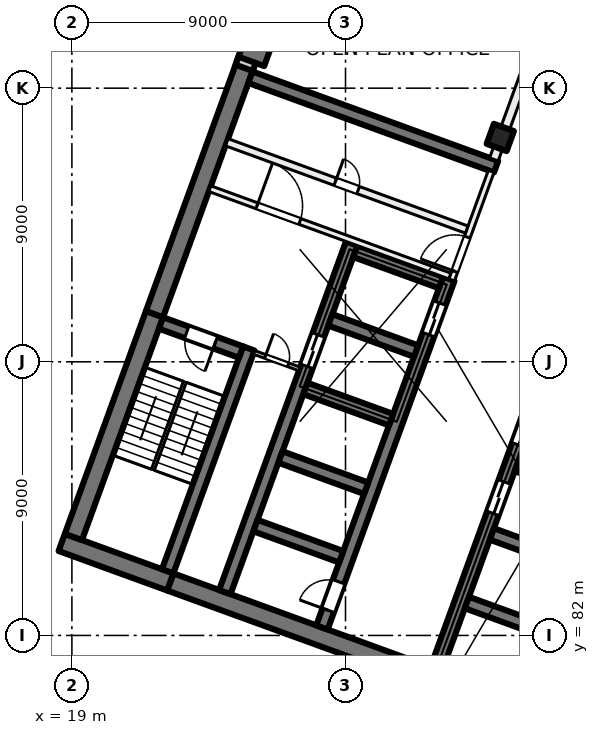
"""IFC4 building model, lengths in metres.
Left out: names, types, materials, properties, quantities, classifications, styles, units other than length and angle.
Written with IfcOpenShell. Run it as: python <this file> out.ifc"""

import sys

from ifc_helpers import new_model, si_unit, direction, frame, frame_2d, origin, origin_2d, place, context, subcontext, project, spatial, rectangle, extrude, element, fill, save


model = new_model("IFC4")
c1 = context("Model", 3, precision=1e-05, world=origin(), true_north=direction((0.0, 1.0)))
c2 = subcontext(c1, "Body", "Model", "MODEL_VIEW")
j1 = project(units=[si_unit("LENGTHUNIT", "METRE"), si_unit("PLANEANGLEUNIT", "RADIAN")], contexts=[c1])
p1 = place(None, origin())
s1 = spatial("IfcSite", under=j1, at=p1, CompositionType="ELEMENT")
p2 = place(p1, origin())
s2 = spatial("IfcBuilding", under=s1, at=p2, CompositionType="ELEMENT")
p3 = place(p2, frame((0.0, 0.0, 47.5)))
s3 = spatial("IfcBuildingStorey", under=s2, at=p3, CompositionType="ELEMENT", Elevation=47.5)
p4 = place(p3, frame((33.091, 98.379, 0.0), z_axis=(0.0, 0.0, 1.0), x_axis=(-0.342020143326, -0.939692620786, 0.0)))
e1 = element("IfcColumn", 1, at=p4, inside=s3, PredefinedType="COLUMN", context=c2, shape_type="SweptSolid", body=[
    extrude(rectangle(XDim=0.7, YDim=0.7, at=origin_2d()), origin(), (0.0, 0.0, 1.0), 4.0),
])
p5 = place(p3, frame((25.056, 101.303, 0.0), z_axis=(0.0, 0.0, 1.0), x_axis=(-0.342020143326, -0.939692620786, 0.0)))
e2 = element("IfcColumn", 2, at=p5, inside=s3, PredefinedType="COLUMN", context=c2, shape_type="SweptSolid", body=[
    extrude(rectangle(XDim=0.9, YDim=0.9, at=origin_2d()), origin(), (0.0, 0.0, 1.0), 4.0),
])
p6 = place(p3, frame((35.767, 78.835, 0.0), z_axis=(0.0, 0.0, 1.0), x_axis=(-0.939692894512, 0.342019391267, 0.0)))
e3 = element("IfcWall", 3, at=p6, inside=s3, PredefinedType="SHEAR", context=c2, shape_type="SweptSolid", body=[
    extrude(rectangle(XDim=14.4, YDim=0.6, at=frame_2d((7.2, 0.0))), origin(), (0.0, 0.0, 1.0), 4.0),
])
p7 = place(p3, frame((22.236, 83.76, 0.0), z_axis=(0.0, 0.0, 1.0), x_axis=(-0.939680822529, 0.342052557032, 0.0)))
e4 = element("IfcWall", 4, at=p7, inside=s3, PredefinedType="SHEAR", context=c2, shape_type="SweptSolid", body=[
    extrude(rectangle(XDim=3.8, YDim=0.6, at=frame_2d((1.9, 0.0))), origin(), (0.0, 0.0, 1.0), 4.0),
])
p8 = place(p3, frame((19.05, 85.239, 0.0), z_axis=(0.0, 0.0, 1.0), x_axis=(0.342016982193, 0.939693771338, 0.0)))
e5 = element("IfcWall", 5, at=p8, inside=s3, PredefinedType="SHEAR", context=c2, shape_type="SweptSolid", body=[
    extrude(rectangle(XDim=7.8, YDim=0.6, at=frame_2d((3.9, 0.0))), origin(), (0.0, 0.0, 1.0), 4.0),
])
p9 = place(p3, frame((21.717, 92.568, 0.0), z_axis=(0.0, 0.0, 1.0), x_axis=(0.342016162452, 0.939694069696, 0.0)))
e6 = element("IfcWall", 6, at=p9, inside=s3, PredefinedType="SHEAR", context=c2, shape_type="SweptSolid", body=[
    extrude(rectangle(XDim=8.9, YDim=0.6, at=frame_2d((4.45, 0.0))), origin(), (0.0, 0.0, 1.0), 4.0),
])
p10 = place(p3, frame((22.15, 84.11, 0.0), z_axis=(0.0, 0.0, 1.0), x_axis=(0.342016982193, 0.939693771338, 0.0)))
e7 = element("IfcWall", 7, at=p10, inside=s3, PredefinedType="SHEAR", context=c2, shape_type="SweptSolid", body=[
    extrude(rectangle(XDim=7.8, YDim=0.4, at=frame_2d((3.9, 0.0))), origin(), (0.0, 0.0, 1.0), 4.0),
])
p11 = place(p3, frame((24.562, 91.32, 0.0), z_axis=(0.0, 0.0, 1.0), x_axis=(-0.939717030584, 0.341953070509, 0.0)))
e8 = element("IfcWall", 8, at=p11, inside=s3, PredefinedType="SHEAR", context=c2, shape_type="SweptSolid", body=[
    extrude(rectangle(XDim=2.8, YDim=0.4, at=frame_2d((1.4, 0.0))), origin(), (0.0, 0.0, 1.0), 4.0),
])
p12 = place(p11, frame((0.9, 0.0, 0.0)))
e9 = element("IfcOpeningElement", 9, at=p12, cuts=e8, PredefinedType="OPENING", context=c2, shape_type="SweptSolid", body=[
    extrude(rectangle(XDim=1.0, YDim=2.1, at=frame_2d((0.5, 1.05))), frame((0.0, 0.21, 0.0), z_axis=(0.0, -1.0, 0.0), x_axis=(1.0, 0.0, 0.0)), (0.0, 0.0, 1.0), 0.42),
])
p13 = place(p3, frame((30.984, 80.895, 0.0), z_axis=(0.0, 0.0, 1.0), x_axis=(0.342021021735, 0.939692301071, 0.0)))
e10 = element("IfcWall", 10, at=p13, inside=s3, PredefinedType="SHEAR", context=c2, shape_type="SweptSolid", body=[
    extrude(rectangle(XDim=12.2, YDim=0.4, at=frame_2d((6.1, 0.0))), origin(), (0.0, 0.0, 1.0), 4.0),
])
p14 = place(p13, frame((5.45, 0.0, 0.0)))
e11 = element("IfcOpeningElement", 11, at=p14, cuts=e10, PredefinedType="OPENING", context=c2, shape_type="SweptSolid", body=[
    extrude(rectangle(XDim=1.1, YDim=2.1, at=frame_2d((0.55, 1.05))), frame((0.0, 0.21, 0.0), z_axis=(0.0, -1.0, 0.0), x_axis=(1.0, 0.0, 0.0)), (0.0, 0.0, 1.0), 0.42),
])
p15 = place(p13, frame((7.85, 0.0, 0.0)))
e12 = element("IfcOpeningElement", 12, at=p15, cuts=e10, PredefinedType="OPENING", context=c2, shape_type="SweptSolid", body=[
    extrude(rectangle(XDim=1.1, YDim=2.1, at=frame_2d((0.55, 1.05))), frame((0.0, 0.21, 0.0), z_axis=(0.0, -1.0, 0.0), x_axis=(1.0, 0.0, 0.0)), (0.0, 0.0, 1.0), 0.42),
])
p16 = place(p13, frame((10.25, 0.0, 0.0)))
e13 = element("IfcOpeningElement", 13, at=p16, cuts=e10, PredefinedType="OPENING", context=c2, shape_type="SweptSolid", body=[
    extrude(rectangle(XDim=1.1, YDim=2.1, at=frame_2d((0.55, 1.05))), frame((0.0, 0.21, 0.0), z_axis=(0.0, -1.0, 0.0), x_axis=(1.0, 0.0, 0.0)), (0.0, 0.0, 1.0), 0.42),
])
for number, where, z_axis, x_axis in (
    (14, (34.812, 82.056, 0.0), (0.0, 0.0, 1.0), (-0.94, 0.342, 0.0)),
    (15, (35.632, 84.311, 0.0), (0.0, 0.0, 1.0), (-0.94, 0.342, 0.0)),
    (16, (36.453, 86.566, 0.0), (0.0, 0.0, 1.0), (-0.94, 0.342, 0.0)),
):
    element("IfcWall", number, at=place(p3, frame(where, z_axis=z_axis, x_axis=x_axis)), inside=s3, PredefinedType="SHEAR", context=c2, shape_type="SweptSolid", body=[
        extrude(rectangle(XDim=3.0, YDim=0.4, at=frame_2d((1.5, 0.0))), origin(), (0.0, 0.0, 1.0), 4.0),
    ])
p17 = place(p3, frame((27.225, 82.263, 0.0), z_axis=(0.0, 0.0, 1.0), x_axis=(0.342014590177, 0.939694641948, 0.0)))
e17 = element("IfcWall", 17, at=p17, inside=s3, PredefinedType="SHEAR", context=c2, shape_type="SweptSolid", body=[
    extrude(rectangle(XDim=12.2, YDim=0.4, at=frame_2d((6.1, 0.0))), origin(), (0.0, 0.0, 1.0), 4.0),
])
p18 = place(p17, frame((10.25, 0.0, 0.0)))
e18 = element("IfcOpeningElement", 18, at=p18, cuts=e17, PredefinedType="OPENING", context=c2, shape_type="SweptSolid", body=[
    extrude(rectangle(XDim=1.1, YDim=2.1, at=frame_2d((0.55, 1.05))), frame((0.0, 0.21, 0.0), z_axis=(0.0, -1.0, 0.0), x_axis=(1.0, 0.0, 0.0)), (0.0, 0.0, 1.0), 0.42),
])
p19 = place(p17, frame((0.6, 0.0, 0.0)))
e19 = element("IfcOpeningElement", 19, at=p19, cuts=e17, PredefinedType="OPENING", context=c2, shape_type="SweptSolid", body=[
    extrude(rectangle(XDim=1.0, YDim=2.1, at=frame_2d((0.5, 1.05))), frame((0.0, 0.21, 0.0), z_axis=(0.0, -1.0, 0.0), x_axis=(1.0, 0.0, 0.0)), (0.0, 0.0, 1.0), 0.42),
])
p20 = place(p3, frame((24.03, 83.426, 0.0), z_axis=(0.0, 0.0, 1.0), x_axis=(0.342014590177, 0.939694641948, 0.0)))
e20 = element("IfcWall", 20, at=p20, inside=s3, PredefinedType="SHEAR", context=c2, shape_type="SweptSolid", body=[
    extrude(rectangle(XDim=12.2, YDim=0.4, at=frame_2d((6.1, 0.0))), origin(), (0.0, 0.0, 1.0), 4.0),
])
p21 = place(p20, frame((7.9, 0.0, 0.0)))
e21 = element("IfcOpeningElement", 21, at=p21, cuts=e20, PredefinedType="OPENING", context=c2, shape_type="SweptSolid", body=[
    extrude(rectangle(XDim=1.1, YDim=2.1, at=frame_2d((0.55, 1.05))), frame((0.0, 0.21, 0.0), z_axis=(0.0, -1.0, 0.0), x_axis=(1.0, 0.0, 0.0)), (0.0, 0.0, 1.0), 0.42),
])
p22 = place(p3, frame((27.858, 84.587, 0.0), z_axis=(0.0, 0.0, 1.0), x_axis=(-0.939686455819, 0.342037080957, 0.0)))
e22 = element("IfcWall", 22, at=p22, inside=s3, PredefinedType="SHEAR", context=c2, shape_type="SweptSolid", body=[
    extrude(rectangle(XDim=3.0, YDim=0.4, at=frame_2d((1.5, 0.0))), origin(), (0.0, 0.0, 1.0), 4.0),
])
p23 = place(p3, frame((28.678, 86.842, 0.0), z_axis=(0.0, 0.0, 1.0), x_axis=(-0.939676934218, 0.342063238742, 0.0)))
e23 = element("IfcWall", 23, at=p23, inside=s3, PredefinedType="SHEAR", context=c2, shape_type="SweptSolid", body=[
    extrude(rectangle(XDim=3.0, YDim=0.4, at=frame_2d((1.5, 0.0))), origin(), (0.0, 0.0, 1.0), 4.0),
])
for number, where, z_axis, x_axis in (
    (24, (29.5, 89.097, 0.0), (0.0, 0.0, 1.0), (-0.94, 0.342, 0.0)),
    (25, (30.32, 91.353, 0.0), (0.0, 0.0, 1.0), (-0.94, 0.342, 0.0)),
    (26, (31.141, 93.608, 0.0), (0.0, 0.0, 1.0), (-0.94, 0.342, 0.0)),
):
    element("IfcWall", number, at=place(p3, frame(where, z_axis=z_axis, x_axis=x_axis)), inside=s3, PredefinedType="SHEAR", context=c2, shape_type="SweptSolid", body=[
        extrude(rectangle(XDim=3.0, YDim=0.4, at=frame_2d((1.5, 0.0))), origin(), (0.0, 0.0, 1.0), 4.0),
    ])
p24 = place(p3, frame((32.953, 97.418, 0.0), z_axis=(0.0, 0.0, 1.0), x_axis=(-0.93969060187, 0.342025690201, 0.0)))
e27 = element("IfcWall", 27, at=p24, inside=s3, PredefinedType="SHEAR", context=c2, shape_type="SweptSolid", body=[
    extrude(rectangle(XDim=8.6, YDim=0.4, at=frame_2d((4.3, 0.0))), origin(), (0.0, 0.0, 1.0), 4.0),
])
p25 = place(p3, frame((24.666, 100.669, 0.0), z_axis=(0.0, 0.0, 1.0), x_axis=(0.34201964167, 0.939692803373, 0.0)))
e28 = element("IfcWall", 28, at=p25, inside=s3, PredefinedType="SOLIDWALL", context=c2, shape_type="SweptSolid", body=[
    extrude(rectangle(XDim=32.884, YDim=0.6, at=frame_2d((16.442, 0.0))), origin(), (0.0, 0.0, 1.0), 3.625),
])
p26 = place(p25, frame((1.48, 0.0, 0.9)))
e29 = element("IfcOpeningElement", 29, at=p26, cuts=e28, PredefinedType="OPENING", context=c2, shape_type="SweptSolid", body=[
    extrude(rectangle(XDim=3.0, YDim=2.4, at=frame_2d((1.5, 1.2))), frame((0.0, 0.31, 0.0), z_axis=(0.0, -1.0, 0.0), x_axis=(1.0, 0.0, 0.0)), (0.0, 0.0, 1.0), 0.62),
])
p27 = place(p25, frame((5.98, 0.0, 0.9)))
e30 = element("IfcOpeningElement", 30, at=p27, cuts=e28, PredefinedType="OPENING", context=c2, shape_type="SweptSolid", body=[
    extrude(rectangle(XDim=3.0, YDim=2.4, at=frame_2d((1.5, 1.2))), frame((0.0, 0.31, 0.0), z_axis=(0.0, -1.0, 0.0), x_axis=(1.0, 0.0, 0.0)), (0.0, 0.0, 1.0), 0.62),
])
p28 = place(p25, frame((10.48, 0.0, 0.9)))
e31 = element("IfcOpeningElement", 31, at=p28, cuts=e28, PredefinedType="OPENING", context=c2, shape_type="SweptSolid", body=[
    extrude(rectangle(XDim=3.0, YDim=2.4, at=frame_2d((1.5, 1.2))), frame((0.0, 0.31, 0.0), z_axis=(0.0, -1.0, 0.0), x_axis=(1.0, 0.0, 0.0)), (0.0, 0.0, 1.0), 0.62),
])
p29 = place(p25, frame((14.98, 0.0, 0.9)))
e32 = element("IfcOpeningElement", 32, at=p29, cuts=e28, PredefinedType="OPENING", context=c2, shape_type="SweptSolid", body=[
    extrude(rectangle(XDim=3.0, YDim=2.4, at=frame_2d((1.5, 1.2))), frame((0.0, 0.31, 0.0), z_axis=(0.0, -1.0, 0.0), x_axis=(1.0, 0.0, 0.0)), (0.0, 0.0, 1.0), 0.62),
])
p30 = place(p25, frame((19.48, 0.0, 0.9)))
e33 = element("IfcOpeningElement", 33, at=p30, cuts=e28, PredefinedType="OPENING", context=c2, shape_type="SweptSolid", body=[
    extrude(rectangle(XDim=3.0, YDim=2.4, at=frame_2d((1.5, 1.2))), frame((0.0, 0.31, 0.0), z_axis=(0.0, -1.0, 0.0), x_axis=(1.0, 0.0, 0.0)), (0.0, 0.0, 1.0), 0.62),
])
p31 = place(p25, frame((23.98, 0.0, 0.9)))
e34 = element("IfcOpeningElement", 34, at=p31, cuts=e28, PredefinedType="OPENING", context=c2, shape_type="SweptSolid", body=[
    extrude(rectangle(XDim=3.0, YDim=2.4, at=frame_2d((1.5, 1.2))), frame((0.0, 0.31, 0.0), z_axis=(0.0, -1.0, 0.0), x_axis=(1.0, 0.0, 0.0)), (0.0, 0.0, 1.0), 0.62),
])
p32 = place(p25, frame((28.48, 0.0, 0.9)))
e35 = element("IfcOpeningElement", 35, at=p32, cuts=e28, PredefinedType="OPENING", context=c2, shape_type="SweptSolid", body=[
    extrude(rectangle(XDim=3.0, YDim=2.4, at=frame_2d((1.5, 1.2))), frame((0.0, 0.31, 0.0), z_axis=(0.0, -1.0, 0.0), x_axis=(1.0, 0.0, 0.0)), (0.0, 0.0, 1.0), 0.62),
])
p33 = place(p3, frame((31.491, 93.693, 0.0), z_axis=(0.0, 0.0, 1.0), x_axis=(0.341995824804, 0.939701471648, 0.0)))
e36 = element("IfcWall", 36, at=p33, inside=s3, PredefinedType="PARTITIONING", context=c2, shape_type="SweptSolid", body=[
    extrude(rectangle(XDim=3.8, YDim=0.2, at=frame_2d((1.9, 0.0))), origin(), (0.0, 0.0, 1.0), 3.625),
])
p34 = place(p33, frame((0.3, 0.0, 0.0)))
e37 = element("IfcOpeningElement", 37, at=p34, cuts=e36, PredefinedType="OPENING", context=c2, shape_type="SweptSolid", body=[
    extrude(rectangle(XDim=1.2, YDim=2.1, at=frame_2d((0.6, 1.05))), frame((0.0, 0.11, 0.0), z_axis=(0.0, -1.0, 0.0), x_axis=(1.0, 0.0, 0.0)), (0.0, 0.0, 1.0), 0.22),
])
p35 = place(p3, frame((23.538, 96.694, 0.0), z_axis=(0.0, 0.0, 1.0), x_axis=(0.939691552312, -0.342023078919, 0.0)))
e38 = element("IfcWall", 38, at=p35, inside=s3, PredefinedType="PARTITIONING", context=c2, shape_type="SweptSolid", body=[
    extrude(rectangle(XDim=8.4, YDim=0.2, at=frame_2d((4.2, 0.0))), origin(), (0.0, 0.0, 1.0), 3.625),
])
p36 = place(p35, frame((1.65, 0.0, 0.0)))
e39 = element("IfcOpeningElement", 39, at=p36, cuts=e38, PredefinedType="OPENING", context=c2, shape_type="SweptSolid", body=[
    extrude(rectangle(XDim=1.5, YDim=2.1, at=frame_2d((0.75, 1.05))), frame((0.0, 0.11, 0.0), z_axis=(0.0, -1.0, 0.0), x_axis=(1.0, 0.0, 0.0)), (0.0, 0.0, 1.0), 0.22),
])
p37 = place(p3, frame((24.094, 98.221, 0.0), z_axis=(0.0, 0.0, 1.0), x_axis=(0.939691552312, -0.342023078919, 0.0)))
e40 = element("IfcWall", 40, at=p37, inside=s3, PredefinedType="PARTITIONING", context=c2, shape_type="SweptSolid", body=[
    extrude(rectangle(XDim=8.4, YDim=0.25, at=frame_2d((4.2, 0.0))), origin(), (0.0, 0.0, 1.0), 3.625),
])
p38 = place(p37, frame((3.8, 0.0, 0.0)))
e41 = element("IfcOpeningElement", 41, at=p38, cuts=e40, PredefinedType="OPENING", context=c2, shape_type="SweptSolid", body=[
    extrude(rectangle(XDim=0.8, YDim=2.1, at=frame_2d((0.4, 1.05))), frame((0.0, 0.135, 0.0), z_axis=(0.0, -1.0, 0.0), x_axis=(1.0, 0.0, 0.0)), (0.0, 0.0, 1.0), 0.27),
])
p39 = place(p3, frame((24.985, 91.312, 0.0), z_axis=(0.0, 0.0, 1.0), x_axis=(0.939708740826, -0.341975850632, 0.0)))
e42 = element("IfcWall", 42, at=p39, inside=s3, PredefinedType="PARTITIONING", context=c2, shape_type="SweptSolid", body=[
    extrude(rectangle(XDim=1.6, YDim=0.125, at=frame_2d((0.8, 0.0))), origin(), (0.0, 0.0, 1.0), 3.625),
])
p40 = place(p39, frame((0.4, 0.0, 0.0)))
e43 = element("IfcOpeningElement", 43, at=p40, cuts=e42, PredefinedType="OPENING", context=c2, shape_type="SweptSolid", body=[
    extrude(rectangle(XDim=0.8, YDim=2.1, at=frame_2d((0.4, 1.05))), frame((0.0, 0.073, 0.0), z_axis=(0.0, -1.0, 0.0), x_axis=(1.0, 0.0, 0.0)), (0.0, 0.0, 1.0), 0.145),
])
p41 = place(p3, frame((32.881, 97.657, 0.0), z_axis=(0.0, 0.0, 1.0), x_axis=(0.342017360004, 0.939693633828, 0.0)))
e44 = element("IfcWall", 44, at=p41, inside=s3, PredefinedType="PARTITIONING", context=c2, shape_type="SweptSolid", body=[
    extrude(rectangle(XDim=34.516, YDim=0.3, at=frame_2d((17.258, 0.0))), origin(), (0.0, 0.0, 1.0), 3.625),
])
p42 = place(p41, frame((11.5, 0.0, 0.0)))
e45 = element("IfcOpeningElement", 45, at=p42, cuts=e44, PredefinedType="OPENING", context=c2, shape_type="SweptSolid", body=[
    extrude(rectangle(XDim=1.0, YDim=2.1, at=frame_2d((0.5, 1.05))), frame((0.0, 0.16, 0.0), z_axis=(0.0, -1.0, 0.0), x_axis=(1.0, 0.0, 0.0)), (0.0, 0.0, 1.0), 0.32),
])
p43 = place(p41, frame((20.1, 0.0, 0.0)))
e46 = element("IfcOpeningElement", 46, at=p43, cuts=e44, PredefinedType="OPENING", context=c2, shape_type="SweptSolid", body=[
    extrude(rectangle(XDim=1.8, YDim=2.1, at=frame_2d((0.9, 1.05))), frame((0.0, 0.16, 0.0), z_axis=(0.0, -1.0, 0.0), x_axis=(1.0, 0.0, 0.0)), (0.0, 0.0, 1.0), 0.32),
])
p44 = place(p18, origin())
e47 = element("IfcDoor", 47, at=p44, inside=s3, OperationType="DOUBLE_DOOR_SLIDING", PredefinedType="DOOR", context=c2, shape_type="SweptSolid", body=[
    extrude(rectangle(XDim=1.1, YDim=2.1, at=frame_2d((0.55, 1.05))), frame((0.0, 0.025, 0.0), z_axis=(0.0, -1.0, 0.0), x_axis=(1.0, 0.0, 0.0)), (0.0, 0.0, 1.0), 0.05),
])
fill(e18, e47)
p45 = place(p14, origin())
e48 = element("IfcDoor", 48, at=p45, inside=s3, OperationType="DOUBLE_DOOR_SLIDING", PredefinedType="DOOR", context=c2, shape_type="SweptSolid", body=[
    extrude(rectangle(XDim=1.1, YDim=2.1, at=frame_2d((0.55, 1.05))), frame((0.0, 0.025, 0.0), z_axis=(0.0, -1.0, 0.0), x_axis=(1.0, 0.0, 0.0)), (0.0, 0.0, 1.0), 0.05),
])
fill(e11, e48)
p46 = place(p15, origin())
e49 = element("IfcDoor", 49, at=p46, inside=s3, OperationType="DOUBLE_DOOR_SLIDING", PredefinedType="DOOR", context=c2, shape_type="SweptSolid", body=[
    extrude(rectangle(XDim=1.1, YDim=2.1, at=frame_2d((0.55, 1.05))), frame((0.0, 0.025, 0.0), z_axis=(0.0, -1.0, 0.0), x_axis=(1.0, 0.0, 0.0)), (0.0, 0.0, 1.0), 0.05),
])
fill(e12, e49)
p47 = place(p19, origin())
e50 = element("IfcDoor", 50, at=p47, inside=s3, OperationType="SINGLE_SWING_LEFT", PredefinedType="DOOR", context=c2, shape_type="SweptSolid", body=[
    extrude(rectangle(XDim=1.0, YDim=2.1, at=frame_2d((0.5, 1.05))), frame((0.0, 0.025, 0.0), z_axis=(0.0, -1.0, 0.0), x_axis=(1.0, 0.0, 0.0)), (0.0, 0.0, 1.0), 0.05),
])
fill(e19, e50)
p48 = place(p34, origin())
e51 = element("IfcDoor", 51, at=p48, inside=s3, OperationType="DOUBLE_DOOR_SINGLE_SWING", PredefinedType="DOOR", context=c2, shape_type="SweptSolid", body=[
    extrude(rectangle(XDim=1.2, YDim=2.1, at=frame_2d((0.6, 1.05))), frame((0.0, 0.025, 0.0), z_axis=(0.0, -1.0, 0.0), x_axis=(1.0, 0.0, 0.0)), (0.0, 0.0, 1.0), 0.05),
])
fill(e37, e51)
p49 = place(p36, origin())
e52 = element("IfcDoor", 52, at=p49, inside=s3, OperationType="DOUBLE_DOOR_SINGLE_SWING", PredefinedType="DOOR", context=c2, shape_type="SweptSolid", body=[
    extrude(rectangle(XDim=1.5, YDim=2.1, at=frame_2d((0.75, 1.05))), frame((0.0, 0.025, 0.0), z_axis=(0.0, -1.0, 0.0), x_axis=(1.0, 0.0, 0.0)), (0.0, 0.0, 1.0), 0.05),
])
fill(e39, e52)
p50 = place(p12, origin())
e53 = element("IfcDoor", 53, at=p50, inside=s3, OperationType="SINGLE_SWING_LEFT", PredefinedType="DOOR", context=c2, shape_type="SweptSolid", body=[
    extrude(rectangle(XDim=1.0, YDim=2.1, at=frame_2d((0.5, 1.05))), frame((0.0, 0.025, 0.0), z_axis=(0.0, -1.0, 0.0), x_axis=(1.0, 0.0, 0.0)), (0.0, 0.0, 1.0), 0.05),
])
fill(e9, e53)
p51 = place(p40, origin())
e54 = element("IfcDoor", 54, at=p51, inside=s3, OperationType="SINGLE_SWING_RIGHT", PredefinedType="DOOR", context=c2, shape_type="SweptSolid", body=[
    extrude(rectangle(XDim=0.8, YDim=2.1, at=frame_2d((0.4, 1.05))), frame((0.0, 0.025, 0.0), z_axis=(0.0, -1.0, 0.0), x_axis=(1.0, 0.0, 0.0)), (0.0, 0.0, 1.0), 0.05),
])
fill(e43, e54)
p52 = place(p38, origin())
e55 = element("IfcDoor", 55, at=p52, inside=s3, OperationType="SINGLE_SWING_LEFT", PredefinedType="DOOR", context=c2, shape_type="SweptSolid", body=[
    extrude(rectangle(XDim=0.8, YDim=2.1, at=frame_2d((0.4, 1.05))), frame((0.0, 0.025, 0.0), z_axis=(0.0, -1.0, 0.0), x_axis=(1.0, 0.0, 0.0)), (0.0, 0.0, 1.0), 0.05),
])
fill(e41, e55)
p53 = place(p21, origin())
e56 = element("IfcDoor", 56, at=p53, inside=s3, OperationType="DOUBLE_DOOR_SLIDING", PredefinedType="DOOR", context=c2, shape_type="SweptSolid", body=[
    extrude(rectangle(XDim=1.1, YDim=2.1, at=frame_2d((0.55, 1.05))), frame((0.0, 0.025, 0.0), z_axis=(0.0, -1.0, 0.0), x_axis=(1.0, 0.0, 0.0)), (0.0, 0.0, 1.0), 0.05),
])
fill(e21, e56)
save(model, sys.argv[1])
